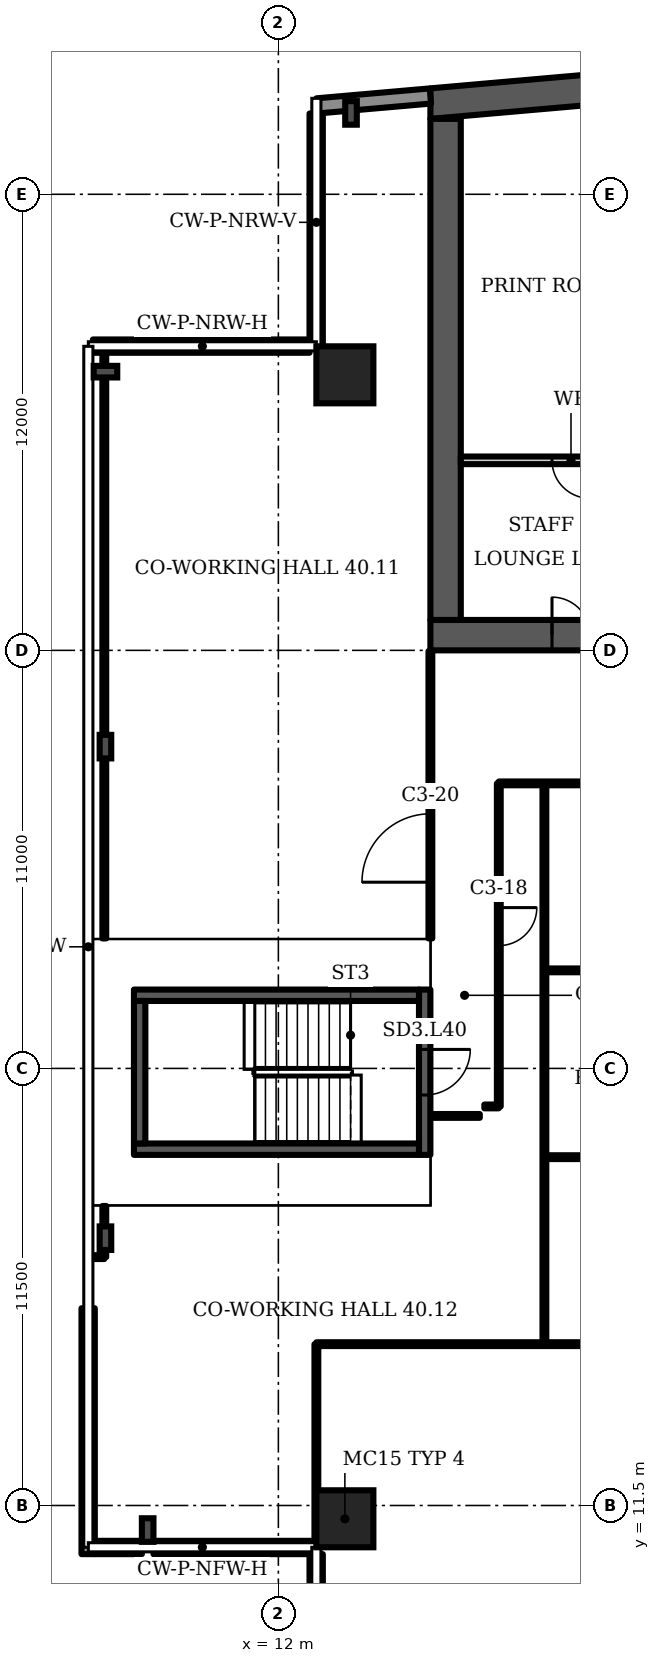
"""IFC4 building model, lengths in metres.
Left out: names, types, materials, properties, quantities, classifications, styles, units other than length and angle.
Written with IfcOpenShell. Run it as: python <this file> out.ifc"""

import sys

from ifc_helpers import new_model, si_unit, direction, frame, frame_2d, origin, origin_2d, place, context, subcontext, project, spatial, polyline, rectangle, i_section, outline, extrude, element, fill, save


model = new_model("IFC4")
c1 = context("Model", 3, precision=1e-05, world=origin(), true_north=direction((0.0, 1.0)))
c2 = subcontext(c1, "Body", "Model", "MODEL_VIEW")
j1 = project(units=[si_unit("LENGTHUNIT", "METRE"), si_unit("PLANEANGLEUNIT", "RADIAN")], contexts=[c1])
p1 = place(None, origin())
s1 = spatial("IfcSite", under=j1, at=p1, CompositionType="ELEMENT")
p2 = place(p1, origin())
s2 = spatial("IfcBuilding", under=s1, at=p2, CompositionType="ELEMENT")
p3 = place(p2, frame((0.0, 0.0, 166.3)))
s3 = spatial("IfcBuildingStorey", under=s2, at=p3, CompositionType="ELEMENT", Elevation=166.3)
p4 = place(p3, frame((0.0, 0.0, -0.0)))
e1 = element("IfcWall", 1, at=p4, inside=s3, PredefinedType="SHEAR", context=c2, shape_type="SweptSolid", body=[
    extrude(outline(polyline([(16.0, 47.984), (37.0, 49.822), (58.0, 47.984), (58.0, 48.787), (37.0, 50.625), (16.0, 48.787), (16.0, 47.984)])), origin(), (0.0, 0.0, 1.0), 3.6),
])
p5 = place(p3, frame((16.0, 34.4, 0.0), z_axis=(0.0, 0.0, 1.0), x_axis=(1.0, 0.0, 0.0)))
e2 = element("IfcWall", 2, at=p5, inside=s3, PredefinedType="SHEAR", context=c2, shape_type="SweptSolid", body=[
    extrude(rectangle(XDim=42.0, YDim=0.8, at=frame_2d((21.0, 0.0))), origin(), (0.0, 0.0, 1.0), 3.6),
])
p6 = place(p5, frame((3.2, 0.0, 0.0)))
e3 = element("IfcOpeningElement", 3, at=p6, cuts=e2, PredefinedType="OPENING", context=c2, shape_type="SweptSolid", body=[
    extrude(rectangle(XDim=1.0, YDim=2.1, at=frame_2d((0.5, 1.05))), frame((0.0, 0.41, 0.0), z_axis=(0.0, -1.0, 0.0), x_axis=(1.0, 0.0, 0.0)), (0.0, 0.0, 1.0), 0.82),
])
p7 = place(p5, frame((7.65, 0.0, 0.0)))
e4 = element("IfcOpeningElement", 4, at=p7, cuts=e2, PredefinedType="OPENING", context=c2, shape_type="SweptSolid", body=[
    extrude(rectangle(XDim=1.2, YDim=2.1, at=frame_2d((0.6, 1.05))), frame((0.0, 0.41, 0.0), z_axis=(0.0, -1.0, 0.0), x_axis=(1.0, 0.0, 0.0)), (0.0, 0.0, 1.0), 0.82),
])
p8 = place(p5, frame((14.767, 0.0, 0.0)))
e5 = element("IfcOpeningElement", 5, at=p8, cuts=e2, PredefinedType="OPENING", context=c2, shape_type="SweptSolid", body=[
    extrude(rectangle(XDim=1.1, YDim=2.1, at=frame_2d((0.55, 1.05))), frame((0.0, 0.41, 0.0), z_axis=(0.0, -1.0, 0.0), x_axis=(1.0, 0.0, 0.0)), (0.0, 0.0, 1.0), 0.82),
])
p9 = place(p5, frame((19.133, 0.0, 0.0)))
e6 = element("IfcOpeningElement", 6, at=p9, cuts=e2, PredefinedType="OPENING", context=c2, shape_type="SweptSolid", body=[
    extrude(rectangle(XDim=1.1, YDim=2.1, at=frame_2d((0.55, 1.05))), frame((0.0, 0.41, 0.0), z_axis=(0.0, -1.0, 0.0), x_axis=(1.0, 0.0, 0.0)), (0.0, 0.0, 1.0), 0.82),
])
p10 = place(p5, frame((16.8, 0.0, 0.0)))
e7 = element("IfcOpeningElement", 7, at=p10, cuts=e2, PredefinedType="OPENING", context=c2, shape_type="SweptSolid", body=[
    extrude(rectangle(XDim=1.4, YDim=2.1, at=frame_2d((0.7, 1.05))), frame((0.0, 0.41, 0.0), z_axis=(0.0, -1.0, 0.0), x_axis=(1.0, 0.0, 0.0)), (0.0, 0.0, 1.0), 0.82),
])
p11 = place(p5, frame((21.767, 0.0, 0.0)))
e8 = element("IfcOpeningElement", 8, at=p11, cuts=e2, PredefinedType="OPENING", context=c2, shape_type="SweptSolid", body=[
    extrude(rectangle(XDim=1.1, YDim=2.1, at=frame_2d((0.55, 1.05))), frame((0.0, 0.41, 0.0), z_axis=(0.0, -1.0, 0.0), x_axis=(1.0, 0.0, 0.0)), (0.0, 0.0, 1.0), 0.82),
])
p12 = place(p5, frame((23.95, 0.0, 0.0)))
e9 = element("IfcOpeningElement", 9, at=p12, cuts=e2, PredefinedType="OPENING", context=c2, shape_type="SweptSolid", body=[
    extrude(rectangle(XDim=1.1, YDim=2.1, at=frame_2d((0.55, 1.05))), frame((0.0, 0.41, 0.0), z_axis=(0.0, -1.0, 0.0), x_axis=(1.0, 0.0, 0.0)), (0.0, 0.0, 1.0), 0.82),
])
p13 = place(p5, frame((26.133, 0.0, 0.0)))
e10 = element("IfcOpeningElement", 10, at=p13, cuts=e2, PredefinedType="OPENING", context=c2, shape_type="SweptSolid", body=[
    extrude(rectangle(XDim=1.1, YDim=2.1, at=frame_2d((0.55, 1.05))), frame((0.0, 0.41, 0.0), z_axis=(0.0, -1.0, 0.0), x_axis=(1.0, 0.0, 0.0)), (0.0, 0.0, 1.0), 0.82),
])
p14 = place(p5, frame((33.15, 0.0, 0.0)))
e11 = element("IfcOpeningElement", 11, at=p14, cuts=e2, PredefinedType="OPENING", context=c2, shape_type="SweptSolid", body=[
    extrude(rectangle(XDim=1.2, YDim=2.1, at=frame_2d((0.6, 1.05))), frame((0.0, 0.41, 0.0), z_axis=(0.0, -1.0, 0.0), x_axis=(1.0, 0.0, 0.0)), (0.0, 0.0, 1.0), 0.82),
])
p15 = place(p5, frame((35.817, 0.0, 0.0)))
e12 = element("IfcOpeningElement", 12, at=p15, cuts=e2, PredefinedType="OPENING", context=c2, shape_type="SweptSolid", body=[
    extrude(rectangle(XDim=1.0, YDim=2.1, at=frame_2d((0.5, 1.05))), frame((0.0, 0.41, 0.0), z_axis=(0.0, -1.0, 0.0), x_axis=(1.0, 0.0, 0.0)), (0.0, 0.0, 1.0), 0.82),
])
p16 = place(p5, frame((39.95, 0.0, 0.0)))
e13 = element("IfcOpeningElement", 13, at=p16, cuts=e2, PredefinedType="OPENING", context=c2, shape_type="SweptSolid", body=[
    extrude(rectangle(XDim=1.0, YDim=2.1, at=frame_2d((0.5, 1.05))), frame((0.0, 0.41, 0.0), z_axis=(0.0, -1.0, 0.0), x_axis=(1.0, 0.0, 0.0)), (0.0, 0.0, 1.0), 0.82),
])
p17 = place(p5, frame((37.767, 0.0, 0.0)))
e14 = element("IfcOpeningElement", 14, at=p17, cuts=e2, PredefinedType="OPENING", context=c2, shape_type="SweptSolid", body=[
    extrude(rectangle(XDim=1.4, YDim=2.1, at=frame_2d((0.7, 1.05))), frame((0.0, 0.41, 0.0), z_axis=(0.0, -1.0, 0.0), x_axis=(1.0, 0.0, 0.0)), (0.0, 0.0, 1.0), 0.82),
])
p18 = place(p3, frame((16.4, 34.8, 0.0), z_axis=(0.0, 0.0, 1.0), x_axis=(0.0, 1.0, 0.0)))
e15 = element("IfcWall", 15, at=p18, inside=s3, PredefinedType="SHEAR", context=c2, shape_type="SweptSolid", body=[
    extrude(rectangle(XDim=13.184, YDim=0.8, at=frame_2d((6.592, 0.0))), origin(), (0.0, 0.0, 1.0), 3.6),
])
for number, where, z_axis, x_axis in (
    (16, (13.75, 11.15, 0.0), (0.0, 0.0, 1.0), (1.0, 0.0, 0.0)),
    (17, (13.75, 41.25, 0.0), (0.0, 0.0, 1.0), (1.0, 0.0, 0.0)),
):
    element("IfcColumn", number, at=place(p3, frame(where, z_axis=z_axis, x_axis=x_axis)), inside=s3, PredefinedType="COLUMN", context=c2, shape_type="SweptSolid", body=[
        extrude(rectangle(XDim=1.5, YDim=1.5, at=origin_2d()), origin(), (0.0, 0.0, 1.0), 3.6),
    ])
for number, where, z_axis, x_axis in (
    (18, (13.911, 48.141, 0.0), (0.0, 0.0, 1.0), (-1.0, 0.0, 0.0)),
    (19, (7.45, 41.333, 0.0), (0.0, 0.0, 1.0), (0.0, 1.0, 0.0)),
    (20, (7.45, 31.467, 0.0), (0.0, 0.0, 1.0), (-1.0, 0.0, 0.0)),
    (21, (7.45, 18.533, 0.0), (0.0, 0.0, 1.0), (-1.0, 0.0, 0.0)),
    (22, (8.561, 10.854, 0.0), (0.0, 0.0, 1.0), (-1.0, 0.0, 0.0)),
):
    element("IfcColumn", number, at=place(p3, frame(where, z_axis=z_axis, x_axis=x_axis)), inside=s3, PredefinedType="COLUMN", context=c2, shape_type="SweptSolid", body=[
        extrude(i_section(OverallWidth=0.305, OverallDepth=0.62, WebThickness=0.021, FlangeThickness=0.04, FilletRadius=0.027, at=origin_2d()), origin(), (0.0, 0.0, 1.0), 3.6),
    ])
p19 = place(p3, frame((16.0, 48.587, 0.0), z_axis=(0.0, 0.0, 1.0), x_axis=(-0.996194, -0.087168, 0.0)))
e23 = element("IfcWall", 23, at=p19, inside=s3, PredefinedType="SOLIDWALL", context=c2, shape_type="SweptSolid", body=[
    extrude(rectangle(XDim=2.994, YDim=0.4, at=frame_2d((1.497, 0.0))), origin(), (0.0, 0.0, 1.0), 3.2),
])
p20 = place(p3, frame((12.995, 48.126, 0.0), z_axis=(0.0, 0.0, 1.0), x_axis=(0.0, -1.0, 0.0)))
e24 = element("IfcWall", 24, at=p20, inside=s3, PredefinedType="SOLIDWALL", context=c2, shape_type="SweptSolid", body=[
    extrude(rectangle(XDim=6.126, YDim=0.35, at=frame_2d((3.063, 0.0))), origin(), (0.0, 0.0, 1.0), 1.0),
])
p21 = place(p3, frame((12.82, 42.005, 0.0), z_axis=(0.0, 0.0, 1.0), x_axis=(-1.0, 0.0, 0.0)))
e25 = element("IfcWall", 25, at=p21, inside=s3, PredefinedType="SOLIDWALL", context=c2, shape_type="SweptSolid", body=[
    extrude(rectangle(XDim=5.7, YDim=0.35, at=frame_2d((2.85, 0.0))), origin(), (0.0, 0.0, 1.0), 1.0),
])
p22 = place(p3, frame((6.995, 16.69, 0.0), z_axis=(0.0, 0.0, 1.0), x_axis=(0.0, -1.0, 0.0)))
e26 = element("IfcWall", 26, at=p22, inside=s3, PredefinedType="SOLIDWALL", context=c2, shape_type="SweptSolid", body=[
    extrude(rectangle(XDim=6.47, YDim=0.35, at=frame_2d((3.235, 0.0))), origin(), (0.0, 0.0, 1.0), 1.0),
])
p23 = place(p3, frame((7.17, 10.395, 0.0), z_axis=(0.0, 0.0, 1.0), x_axis=(1.0, 0.0, 0.0)))
e27 = element("IfcWall", 27, at=p23, inside=s3, PredefinedType="SOLIDWALL", context=c2, shape_type="SweptSolid", body=[
    extrude(rectangle(XDim=1.238, YDim=0.35, at=frame_2d((0.619, 0.0))), origin(), (0.0, 0.0, 1.0), 1.0),
])
p24 = place(p3, frame((8.713, 10.395, 0.0), z_axis=(0.0, 0.0, 1.0), x_axis=(1.0, 0.0, 0.0)))
e28 = element("IfcWall", 28, at=p24, inside=s3, PredefinedType="SOLIDWALL", context=c2, shape_type="SweptSolid", body=[
    extrude(rectangle(XDim=4.287, YDim=0.35, at=frame_2d((2.143, 0.0))), origin(), (0.0, 0.0, 1.0), 1.0),
])
p25 = place(p3, frame((12.995, 10.22, 0.0), z_axis=(0.0, 0.0, 1.0), x_axis=(0.0, -1.0, 0.0)))
e29 = element("IfcWall", 29, at=p25, inside=s3, PredefinedType="SOLIDWALL", context=c2, shape_type="SweptSolid", body=[
    extrude(rectangle(XDim=5.693, YDim=0.35, at=frame_2d((2.847, 0.0))), origin(), (0.0, 0.0, 1.0), 1.0),
])
p26 = place(p3, frame((16.8, 39.0, 0.0), z_axis=(0.0, 0.0, 1.0), x_axis=(1.0, 0.0, 0.0)))
e30 = element("IfcWall", 30, at=p26, inside=s3, PredefinedType="PARTITIONING", context=c2, shape_type="SweptSolid", body=[
    extrude(rectangle(XDim=5.8, YDim=0.2, at=frame_2d((2.9, 0.0))), origin(), (0.0, 0.0, 1.0), 3.2),
])
p27 = place(p26, frame((2.4, 0.0, 0.0)))
e31 = element("IfcOpeningElement", 31, at=p27, cuts=e30, PredefinedType="OPENING", context=c2, shape_type="SweptSolid", body=[
    extrude(rectangle(XDim=1.0, YDim=2.1, at=frame_2d((0.5, 1.05))), frame((0.0, 0.11, 0.0), z_axis=(0.0, -1.0, 0.0), x_axis=(1.0, 0.0, 0.0)), (0.0, 0.0, 1.0), 0.22),
])
p28 = place(p3, frame((15.85, 20.725, 0.0), z_axis=(0.0, 0.0, 1.0), x_axis=(0.0, 1.0, 0.0)))
e32 = element("IfcWall", 32, at=p28, inside=s3, PredefinedType="SHEAR", context=c2, shape_type="SweptSolid", body=[
    extrude(rectangle(XDim=4.35, YDim=0.3, at=frame_2d((2.175, 0.0))), origin(), (0.0, 0.0, 1.0), 3.2),
])
p29 = place(p28, frame((1.575, 0.0, 0.0)))
e33 = element("IfcOpeningElement", 33, at=p29, cuts=e32, PredefinedType="OPENING", context=c2, shape_type="SweptSolid", body=[
    extrude(rectangle(XDim=1.2, YDim=2.1, at=frame_2d((0.6, 1.05))), frame((0.0, 0.16, 0.0), z_axis=(0.0, -1.0, 0.0), x_axis=(1.0, 0.0, 0.0)), (0.0, 0.0, 1.0), 0.32),
])
p30 = place(p3, frame((7.02, 18.035, 0.0), z_axis=(0.0, 0.0, 1.0), x_axis=(1.0, 0.0, 0.0)))
e34 = element("IfcWall", 34, at=p30, inside=s3, PredefinedType="PARTITIONING", context=c2, shape_type="SweptSolid", body=[
    extrude(rectangle(XDim=0.4, YDim=0.1, at=frame_2d((0.2, 0.0))), origin(), (0.0, 0.0, 1.0), 3.2),
])
p31 = place(p3, frame((7.42, 18.035, 0.0), z_axis=(0.0, 0.0, 1.0), x_axis=(0.0, 1.0, 0.0)))
e35 = element("IfcWall", 35, at=p31, inside=s3, PredefinedType="PARTITIONING", context=c2, shape_type="SweptSolid", body=[
    extrude(rectangle(XDim=1.345, YDim=0.1, at=frame_2d((0.672, 0.0))), origin(), (0.0, 0.0, 1.0), 2.58),
])
p32 = place(p3, frame((7.42, 26.42, 0.0), z_axis=(0.0, 0.0, 1.0), x_axis=(0.0, 1.0, 0.0)))
e36 = element("IfcWall", 36, at=p32, inside=s3, PredefinedType="PARTITIONING", context=c2, shape_type="SweptSolid", body=[
    extrude(rectangle(XDim=15.56, YDim=0.1, at=frame_2d((7.78, 0.0))), origin(), (0.0, 0.0, 1.0), 2.58),
])
p33 = place(p3, frame((13.0, 10.42, 0.0), z_axis=(0.0, 0.0, 1.0), x_axis=(0.0, 1.0, 0.0)))
e37 = element("IfcWall", 37, at=p33, inside=s3, PredefinedType="PARTITIONING", context=c2, shape_type="SweptSolid", body=[
    extrude(rectangle(XDim=5.325, YDim=0.1, at=frame_2d((2.663, 0.0))), origin(), (0.0, 0.0, 1.0), 3.2),
])
p34 = place(p3, frame((13.0, 15.745, 0.0), z_axis=(0.0, 0.0, 1.0), x_axis=(1.0, 0.0, 0.0)))
e38 = element("IfcWall", 38, at=p34, inside=s3, PredefinedType="PARTITIONING", context=c2, shape_type="SweptSolid", body=[
    extrude(rectangle(XDim=12.6, YDim=0.1, at=frame_2d((6.3, 0.0))), origin(), (0.0, 0.0, 1.0), 3.2),
])
p35 = place(p3, frame((16.0, 26.42, 0.0), z_axis=(0.0, 0.0, 1.0), x_axis=(0.0, 1.0, 0.0)))
e39 = element("IfcWall", 39, at=p35, inside=s3, PredefinedType="PARTITIONING", context=c2, shape_type="SweptSolid", body=[
    extrude(rectangle(XDim=7.56, YDim=0.1, at=frame_2d((3.78, 0.0))), origin(), (0.0, 0.0, 1.0), 3.2),
])
p36 = place(p35, frame((1.48, 0.0, 0.0)))
e40 = element("IfcOpeningElement", 40, at=p36, cuts=e39, PredefinedType="OPENING", context=c2, shape_type="SweptSolid", body=[
    extrude(rectangle(XDim=1.8, YDim=2.1, at=frame_2d((0.9, 1.05))), frame((0.0, 0.06, 0.0), z_axis=(0.0, -1.0, 0.0), x_axis=(1.0, 0.0, 0.0)), (0.0, 0.0, 1.0), 0.12),
])
p37 = place(p3, frame((16.02, 21.75, 0.0), z_axis=(0.0, 0.0, 1.0), x_axis=(1.0, 0.0, 0.0)))
e41 = element("IfcWall", 41, at=p37, inside=s3, PredefinedType="PARTITIONING", context=c2, shape_type="SweptSolid", body=[
    extrude(rectangle(XDim=1.28, YDim=0.1, at=frame_2d((0.64, 0.0))), origin(), (0.0, 0.0, 1.0), 3.2),
])
p38 = place(p3, frame((17.42, 22.0, 0.0), z_axis=(0.0, 0.0, 1.0), x_axis=(1.0, 0.0, 0.0)))
e42 = element("IfcWall", 42, at=p38, inside=s3, PredefinedType="PARTITIONING", context=c2, shape_type="SweptSolid", body=[
    extrude(rectangle(XDim=0.38, YDim=0.1, at=frame_2d((0.19, 0.0))), origin(), (0.0, 0.0, 1.0), 3.2),
])
p39 = place(p3, frame((17.8, 22.0, 0.0), z_axis=(0.0, 0.0, 1.0), x_axis=(0.0, 1.0, 0.0)))
e43 = element("IfcWall", 43, at=p39, inside=s3, PredefinedType="PARTITIONING", context=c2, shape_type="SweptSolid", body=[
    extrude(rectangle(XDim=8.5, YDim=0.1, at=frame_2d((4.25, 0.0))), origin(), (0.0, 0.0, 1.0), 3.2),
])
p40 = place(p39, frame((4.231, 0.0, 0.0)))
e44 = element("IfcOpeningElement", 44, at=p40, cuts=e43, PredefinedType="OPENING", context=c2, shape_type="SweptSolid", body=[
    extrude(rectangle(XDim=1.0, YDim=2.1, at=frame_2d((0.5, 1.05))), frame((0.0, 0.06, 0.0), z_axis=(0.0, -1.0, 0.0), x_axis=(1.0, 0.0, 0.0)), (0.0, 0.0, 1.0), 0.12),
])
p41 = place(p3, frame((17.8, 30.5, 0.0), z_axis=(0.0, 0.0, 1.0), x_axis=(1.0, 0.0, 0.0)))
e45 = element("IfcWall", 45, at=p41, inside=s3, PredefinedType="PARTITIONING", context=c2, shape_type="SweptSolid", body=[
    extrude(rectangle(XDim=7.8, YDim=0.1, at=frame_2d((3.9, 0.0))), origin(), (0.0, 0.0, 1.0), 3.2),
])
p42 = place(p41, frame((6.42, 0.0, 0.0)))
e46 = element("IfcOpeningElement", 46, at=p42, cuts=e45, PredefinedType="OPENING", context=c2, shape_type="SweptSolid", body=[
    extrude(rectangle(XDim=1.0, YDim=2.1, at=frame_2d((0.5, 1.05))), frame((0.0, 0.06, 0.0), z_axis=(0.0, -1.0, 0.0), x_axis=(1.0, 0.0, 0.0)), (0.0, 0.0, 1.0), 0.12),
])
p43 = place(p3, frame((19.0, 15.745, 0.0), z_axis=(0.0, 0.0, 1.0), x_axis=(0.0, 1.0, 0.0)))
e47 = element("IfcWall", 47, at=p43, inside=s3, PredefinedType="PARTITIONING", context=c2, shape_type="SweptSolid", body=[
    extrude(rectangle(XDim=14.755, YDim=0.1, at=frame_2d((7.377, 0.0))), origin(), (0.0, 0.0, 1.0), 3.2),
])
for number, where, z_axis, x_axis in (
    (48, (19.0, 20.665, 0.0), (0.0, 0.0, 1.0), (1.0, 0.0, 0.0)),
    (49, (19.0, 25.58, 0.0), (0.0, 0.0, 1.0), (1.0, 0.0, 0.0)),
):
    element("IfcWall", number, at=place(p3, frame(where, z_axis=z_axis, x_axis=x_axis)), inside=s3, PredefinedType="PARTITIONING", context=c2, shape_type="SweptSolid", body=[
        extrude(rectangle(XDim=6.6, YDim=0.1, at=frame_2d((3.3, 0.0))), origin(), (0.0, 0.0, 1.0), 3.2),
    ])
for number, where, z_axis, x_axis in (
    (50, (8.2, 20.875, 0.0), (0.0, 0.0, 1.0), (1.0, 0.0, 0.0)),
    (51, (8.2, 24.925, 0.0), (0.0, 0.0, 1.0), (1.0, 0.0, 0.0)),
):
    element("IfcWall", number, at=place(p3, frame(where, z_axis=z_axis, x_axis=x_axis)), inside=s3, PredefinedType="SHEAR", context=c2, shape_type="SweptSolid", body=[
        extrude(rectangle(XDim=7.5, YDim=0.3, at=frame_2d((3.75, 0.0))), origin(), (0.0, 0.0, 1.0), 3.2),
    ])
p44 = place(p3, frame((8.35, 21.025, 0.0), z_axis=(0.0, 0.0, 1.0), x_axis=(0.0, 1.0, 0.0)))
e52 = element("IfcWall", 52, at=p44, inside=s3, PredefinedType="SHEAR", context=c2, shape_type="SweptSolid", body=[
    extrude(rectangle(XDim=3.75, YDim=0.3, at=frame_2d((1.875, 0.0))), origin(), (0.0, 0.0, 1.0), 3.2),
])
p45 = place(p6, origin())
e53 = element("IfcDoor", 53, at=p45, inside=s3, OperationType="SINGLE_SWING_LEFT", PredefinedType="DOOR", context=c2, shape_type="SweptSolid", body=[
    extrude(rectangle(XDim=1.0, YDim=2.1, at=frame_2d((0.5, 1.05))), frame((0.0, 0.4, 0.0), z_axis=(0.0, -1.0, 0.0), x_axis=(1.0, 0.0, 0.0)), (0.0, 0.0, 1.0), 0.8),
])
fill(e3, e53)
p46 = place(p27, origin())
e54 = element("IfcDoor", 54, at=p46, inside=s3, OperationType="SINGLE_SWING_RIGHT", PredefinedType="DOOR", context=c2, shape_type="SweptSolid", body=[
    extrude(rectangle(XDim=1.0, YDim=2.1, at=frame_2d((0.5, 1.05))), frame((0.0, 0.025, 0.0), z_axis=(0.0, -1.0, 0.0), x_axis=(1.0, 0.0, 0.0)), (0.0, 0.0, 1.0), 0.05),
])
fill(e31, e54)
p47 = place(p29, origin())
e55 = element("IfcDoor", 55, at=p47, inside=s3, OperationType="SINGLE_SWING_RIGHT", PredefinedType="DOOR", context=c2, shape_type="SweptSolid", body=[
    extrude(rectangle(XDim=1.2, YDim=2.1, at=frame_2d((0.6, 1.05))), frame((0.0, 0.025, 0.0), z_axis=(0.0, -1.0, 0.0), x_axis=(1.0, 0.0, 0.0)), (0.0, 0.0, 1.0), 0.05),
])
fill(e33, e55)
p48 = place(p40, origin())
e56 = element("IfcDoor", 56, at=p48, inside=s3, OperationType="SINGLE_SWING_RIGHT", PredefinedType="DOOR", context=c2, shape_type="SweptSolid", body=[
    extrude(rectangle(XDim=1.0, YDim=2.1, at=frame_2d((0.5, 1.05))), frame((0.0, 0.025, 0.0), z_axis=(0.0, -1.0, 0.0), x_axis=(1.0, 0.0, 0.0)), (0.0, 0.0, 1.0), 0.05),
])
fill(e44, e56)
p49 = place(p36, origin())
e57 = element("IfcDoor", 57, at=p49, inside=s3, OperationType="DOUBLE_DOOR_SINGLE_SWING", PredefinedType="DOOR", context=c2, shape_type="SweptSolid", body=[
    extrude(rectangle(XDim=1.8, YDim=2.1, at=frame_2d((0.9, 1.05))), frame((0.0, 0.025, 0.0), z_axis=(0.0, -1.0, 0.0), x_axis=(1.0, 0.0, 0.0)), (0.0, 0.0, 1.0), 0.05),
])
fill(e40, e57)
save(model, sys.argv[1])
